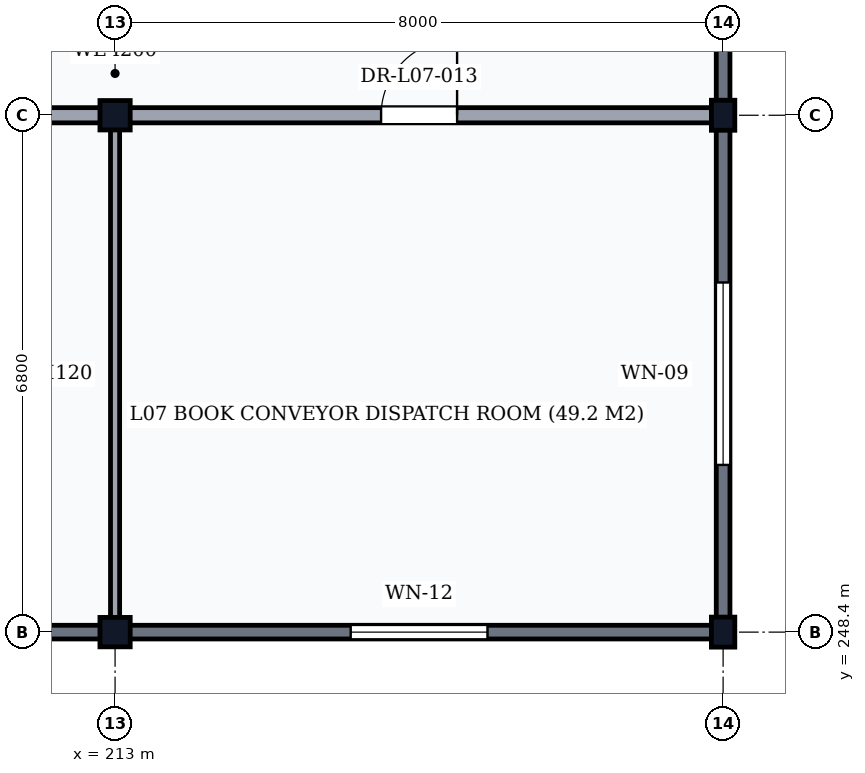
"""IFC4 building model, lengths in metres.
Left out: names, types, materials, properties, quantities, classifications, styles, units other than length and angle.
Written with IfcOpenShell. Run it as: python <this file> out.ifc"""

import sys

from ifc_helpers import new_model, si_unit, direction, frame, frame_2d, origin, origin_2d, place, context, subcontext, project, spatial, rectangle, i_section, extrude, element, fill, save


model = new_model("IFC4")
c1 = context("Model", 3, precision=1e-05, world=origin(), true_north=direction((0.0, 1.0)))
c2 = subcontext(c1, "Body", "Model", "MODEL_VIEW")
j1 = project(units=[si_unit("LENGTHUNIT", "METRE"), si_unit("PLANEANGLEUNIT", "RADIAN")], contexts=[c1])
p1 = place(None, origin())
s1 = spatial("IfcSite", under=j1, at=p1, CompositionType="ELEMENT")
p2 = place(p1, origin())
s2 = spatial("IfcBuilding", under=s1, at=p2, CompositionType="ELEMENT")
p3 = place(p2, frame((0.0, 0.0, 28.2)))
s3 = spatial("IfcBuildingStorey", under=s2, at=p3, CompositionType="ELEMENT", Elevation=28.2)
for number, where, z_axis, x_axis in (
    (1, (213.0, 248.4, 0.0), (0.0, 0.0, 1.0), (1.0, 0.0, 0.0)),
    (2, (213.0, 255.2, 0.0), (0.0, 0.0, 1.0), (1.0, 0.0, 0.0)),
):
    element("IfcColumn", number, at=place(p3, frame(where, z_axis=z_axis, x_axis=x_axis)), inside=s3, PredefinedType="COLUMN", context=c2, shape_type="SweptSolid", body=[
        extrude(i_section(OverallWidth=0.398, OverallDepth=0.387, WebThickness=0.021, FlangeThickness=0.033, FilletRadius=0.015, at=origin_2d()), origin(), (0.0, 0.0, 1.0), 3.9),
    ])
for number, where, z_axis, x_axis in (
    (3, (221.0, 248.4, 0.0), (0.0, 0.0, 1.0), (1.0, 0.0, 0.0)),
    (4, (221.0, 255.2, 0.0), (0.0, 0.0, 1.0), (1.0, 0.0, 0.0)),
):
    element("IfcColumn", number, at=place(p3, frame(where, z_axis=z_axis, x_axis=x_axis)), inside=s3, PredefinedType="COLUMN", context=c2, shape_type="SweptSolid", body=[
        extrude(i_section(OverallWidth=0.308, OverallDepth=0.395, WebThickness=0.021, FlangeThickness=0.04, FilletRadius=0.027, at=origin_2d()), origin(), (0.0, 0.0, 1.0), 3.9),
    ])
p4 = place(p3, frame((205.006, 248.4, 0.0), z_axis=(0.0, 0.0, 1.0), x_axis=(1.0, 0.0, 0.0)))
e5 = element("IfcWall", 5, at=p4, inside=s3, PredefinedType="SOLIDWALL", context=c2, shape_type="SweptSolid", body=[
    extrude(rectangle(XDim=7.988, YDim=0.18, at=frame_2d((3.994, 0.0))), origin(), (0.0, 0.0, 1.0), 3.348),
])
p5 = place(p4, frame((2.994, 0.0, 0.95)))
e6 = element("IfcOpeningElement", 6, at=p5, cuts=e5, PredefinedType="OPENING", context=c2, shape_type="SweptSolid", body=[
    extrude(rectangle(XDim=2.0, YDim=2.1, at=frame_2d((1.0, 1.05))), frame((0.0, 0.105, 0.0), z_axis=(0.0, -1.0, 0.0), x_axis=(1.0, 0.0, 0.0)), (0.0, 0.0, 1.0), 0.21),
])
p6 = place(p3, frame((213.006, 248.4, 0.0), z_axis=(0.0, 0.0, 1.0), x_axis=(1.0, 0.0, 0.0)))
e7 = element("IfcWall", 7, at=p6, inside=s3, PredefinedType="SOLIDWALL", context=c2, shape_type="SweptSolid", body=[
    extrude(rectangle(XDim=7.988, YDim=0.18, at=frame_2d((3.994, 0.0))), origin(), (0.0, 0.0, 1.0), 3.348),
])
p7 = place(p6, frame((3.094, 0.0, 0.95)))
e8 = element("IfcOpeningElement", 8, at=p7, cuts=e7, PredefinedType="OPENING", context=c2, shape_type="SweptSolid", body=[
    extrude(rectangle(XDim=1.8, YDim=2.0, at=frame_2d((0.9, 1.0))), frame((0.0, 0.105, 0.0), z_axis=(0.0, -1.0, 0.0), x_axis=(1.0, 0.0, 0.0)), (0.0, 0.0, 1.0), 0.21),
])
p8 = place(p3, frame((221.0, 248.406, 0.0), z_axis=(0.0, 0.0, 1.0), x_axis=(0.0, 1.0, 0.0)))
e9 = element("IfcWall", 9, at=p8, inside=s3, PredefinedType="SOLIDWALL", context=c2, shape_type="SweptSolid", body=[
    extrude(rectangle(XDim=6.788, YDim=0.18, at=frame_2d((3.394, 0.0))), origin(), (0.0, 0.0, 1.0), 3.428),
])
p9 = place(p8, frame((2.194, 0.0, 0.95)))
e10 = element("IfcOpeningElement", 10, at=p9, cuts=e9, PredefinedType="OPENING", context=c2, shape_type="SweptSolid", body=[
    extrude(rectangle(XDim=2.4, YDim=2.2, at=frame_2d((1.2, 1.1))), frame((0.0, 0.105, 0.0), z_axis=(0.0, -1.0, 0.0), x_axis=(1.0, 0.0, 0.0)), (0.0, 0.0, 1.0), 0.21),
])
p10 = place(p3, frame((221.0, 255.206, 0.0), z_axis=(0.0, 0.0, 1.0), x_axis=(0.0, 1.0, 0.0)))
e11 = element("IfcWall", 11, at=p10, inside=s3, PredefinedType="SOLIDWALL", context=c2, shape_type="SweptSolid", body=[
    extrude(rectangle(XDim=7.588, YDim=0.18, at=frame_2d((3.794, 0.0))), origin(), (0.0, 0.0, 1.0), 3.388),
])
p11 = place(p10, frame((3.966, 0.0, 0.95)))
e12 = element("IfcOpeningElement", 12, at=p11, cuts=e11, PredefinedType="OPENING", context=c2, shape_type="SweptSolid", body=[
    extrude(rectangle(XDim=2.2, YDim=2.1, at=frame_2d((1.1, 1.05))), frame((0.0, 0.105, 0.0), z_axis=(0.0, -1.0, 0.0), x_axis=(1.0, 0.0, 0.0)), (0.0, 0.0, 1.0), 0.21),
])
p12 = place(p3, frame((205.0, 255.2, 0.0), z_axis=(0.0, 0.0, 1.0), x_axis=(1.0, 0.0, 0.0)))
e13 = element("IfcWall", 13, at=p12, inside=s3, PredefinedType="PARTITIONING", context=c2, shape_type="SweptSolid", body=[
    extrude(rectangle(XDim=16.0, YDim=0.2, at=frame_2d((8.0, 0.0))), origin(), (0.0, 0.0, 1.0), 3.058),
])
p13 = place(p12, frame((3.5, 0.0, 0.0)))
e14 = element("IfcOpeningElement", 14, at=p13, cuts=e13, PredefinedType="OPENING", context=c2, shape_type="SweptSolid", body=[
    extrude(rectangle(XDim=1.0, YDim=2.1, at=frame_2d((0.5, 1.05))), frame((0.0, 0.115, 0.0), z_axis=(0.0, -1.0, 0.0), x_axis=(1.0, 0.0, 0.0)), (0.0, 0.0, 1.0), 0.23),
])
p14 = place(p12, frame((11.5, 0.0, 0.0)))
e15 = element("IfcOpeningElement", 15, at=p14, cuts=e13, PredefinedType="OPENING", context=c2, shape_type="SweptSolid", body=[
    extrude(rectangle(XDim=1.0, YDim=2.1, at=frame_2d((0.5, 1.05))), frame((0.0, 0.115, 0.0), z_axis=(0.0, -1.0, 0.0), x_axis=(1.0, 0.0, 0.0)), (0.0, 0.0, 1.0), 0.23),
])
p15 = place(p3, frame((213.0, 248.4, 0.0), z_axis=(0.0, 0.0, 1.0), x_axis=(0.0, 1.0, 0.0)))
e16 = element("IfcWall", 16, at=p15, inside=s3, PredefinedType="PARTITIONING", context=c2, shape_type="SweptSolid", body=[
    extrude(rectangle(XDim=6.8, YDim=0.12, at=frame_2d((3.4, 0.0))), origin(), (0.0, 0.0, 1.0), 3.208),
])
p16 = place(p7, origin())
e17 = element("IfcWindow", 17, at=p16, inside=s3, PartitioningType="DOUBLE_PANEL_VERTICAL", PredefinedType="WINDOW", context=c2, shape_type="SweptSolid", body=[
    extrude(rectangle(XDim=1.8, YDim=2.0, at=frame_2d((0.9, 1.0))), frame((0.0, 0.03, 0.0), z_axis=(0.0, -1.0, 0.0), x_axis=(1.0, 0.0, 0.0)), (0.0, 0.0, 1.0), 0.06),
])
fill(e8, e17)
p17 = place(p9, origin())
e18 = element("IfcWindow", 18, at=p17, inside=s3, PartitioningType="DOUBLE_PANEL_VERTICAL", PredefinedType="WINDOW", context=c2, shape_type="SweptSolid", body=[
    extrude(rectangle(XDim=2.4, YDim=2.2, at=frame_2d((1.2, 1.1))), frame((0.0, 0.03, 0.0), z_axis=(0.0, -1.0, 0.0), x_axis=(1.0, 0.0, 0.0)), (0.0, 0.0, 1.0), 0.06),
])
fill(e10, e18)
p18 = place(p14, frame((1.0, 0.0, 0.0), z_axis=(0.0, 0.0, 1.0), x_axis=(-1.0, 0.0, 0.0)))
e19 = element("IfcDoor", 19, at=p18, inside=s3, OperationType="SINGLE_SWING_LEFT", PredefinedType="DOOR", context=c2, shape_type="SweptSolid", body=[
    extrude(rectangle(XDim=1.0, YDim=2.1, at=frame_2d((0.5, 1.05))), frame((0.0, 0.025, 0.0), z_axis=(0.0, -1.0, 0.0), x_axis=(1.0, 0.0, 0.0)), (0.0, 0.0, 1.0), 0.05),
])
fill(e15, e19)
save(model, sys.argv[1])
